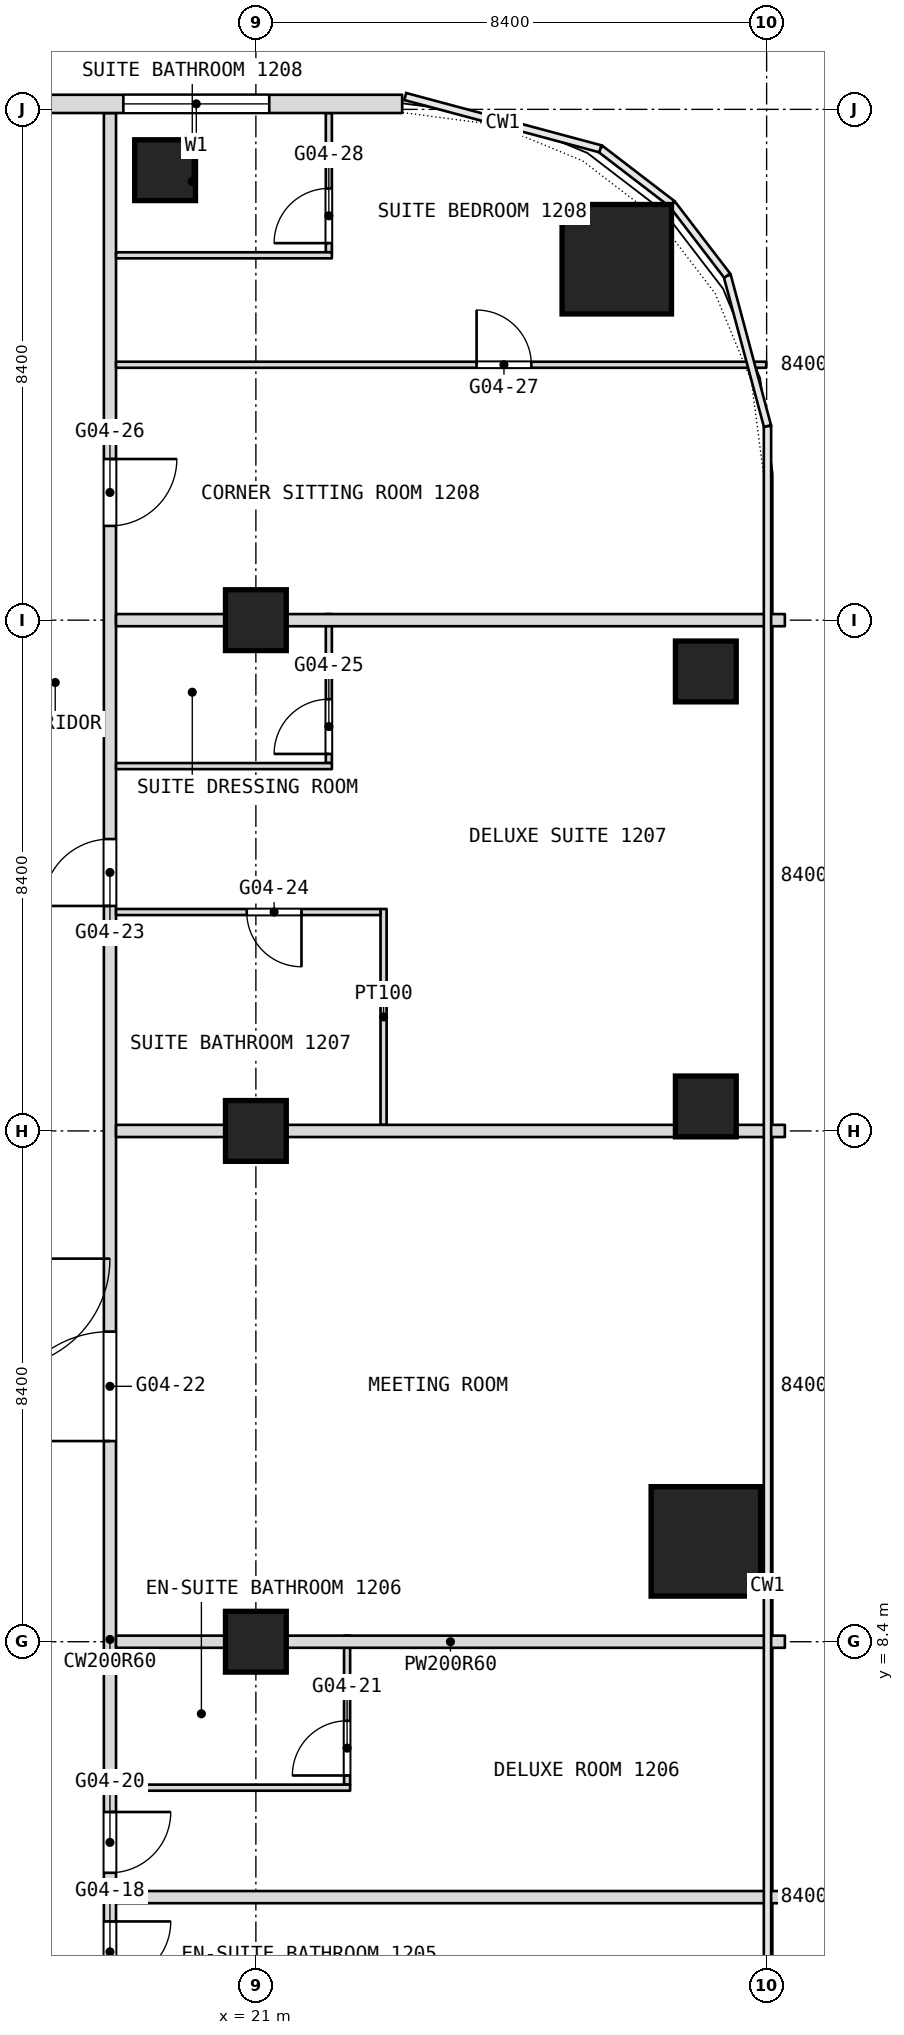
"""IFC4 building model, lengths in metres.
Left out: names, types, materials, properties, quantities, classifications, styles, units other than length and angle.
Written with IfcOpenShell. Run it as: python <this file> out.ifc"""

import sys

from ifc_helpers import new_model, si_unit, direction, frame, frame_2d, origin, origin_2d, place, context, subcontext, project, spatial, rectangle, extrude, element, fill, save


model = new_model("IFC4")
c1 = context("Model", 3, precision=1e-05, world=origin(), true_north=direction((0.0, 1.0)))
c2 = subcontext(c1, "Body", "Model", "MODEL_VIEW")
j1 = project(units=[si_unit("LENGTHUNIT", "METRE"), si_unit("PLANEANGLEUNIT", "RADIAN")], contexts=[c1])
p1 = place(None, origin())
s1 = spatial("IfcSite", under=j1, at=p1, CompositionType="ELEMENT")
p2 = place(p1, origin())
s2 = spatial("IfcBuilding", under=s1, at=p2, CompositionType="ELEMENT")
p3 = place(p2, frame((0.0, 0.0, 58.1)))
s3 = spatial("IfcBuildingStorey", under=s2, at=p3, CompositionType="ELEMENT", Elevation=58.1)
for number, where, z_axis, x_axis in (
    (1, (28.4, 10.05, 0.0), (0.0, 0.0, 1.0), (1.0, 0.0, 0.0)),
    (2, (26.936, 31.135, 0.0), (0.0, 0.0, 1.0), (1.0, 0.0, 0.0)),
):
    element("IfcColumn", number, at=place(p3, frame(where, z_axis=z_axis, x_axis=x_axis)), inside=s3, PredefinedType="COLUMN", context=c2, shape_type="SweptSolid", body=[
        extrude(rectangle(XDim=1.8, YDim=1.8, at=origin_2d()), origin(), (0.0, 0.0, 1.0), 3.6),
    ])
for number, where, z_axis, x_axis in (
    (3, (21.0, 8.4, 0.0), (0.0, 0.0, 1.0), (1.0, 0.0, 0.0)),
    (4, (21.0, 16.8, 0.0), (0.0, 0.0, 1.0), (1.0, 0.0, 0.0)),
    (5, (21.0, 25.2, 0.0), (0.0, 0.0, 1.0), (1.0, 0.0, 0.0)),
    (6, (19.507, 32.6, 0.0), (0.0, 0.0, 1.0), (1.0, 0.0, 0.0)),
    (7, (28.4, 24.356, 0.0), (0.0, 0.0, 1.0), (1.0, 0.0, 0.0)),
    (8, (28.4, 17.203, 0.0), (0.0, 0.0, 1.0), (1.0, 0.0, 0.0)),
):
    element("IfcColumn", number, at=place(p3, frame(where, z_axis=z_axis, x_axis=x_axis)), inside=s3, PredefinedType="COLUMN", context=c2, shape_type="SweptSolid", body=[
        extrude(rectangle(XDim=1.0, YDim=1.0, at=origin_2d()), origin(), (0.0, 0.0, 1.0), 3.6),
    ])
p4 = place(p3, frame((23.1, 16.9, 0.0), z_axis=(0.0, 0.0, 1.0), x_axis=(0.0, 1.0, 0.0)))
e9 = element("IfcWall", 9, at=p4, inside=s3, PredefinedType="PARTITIONING", context=c2, shape_type="SweptSolid", body=[
    extrude(rectangle(XDim=3.55, YDim=0.1, at=frame_2d((1.775, 0.0))), origin(), (0.0, 0.0, 1.0), 3.34),
])
p5 = place(p3, frame((22.5, 6.05, 0.0), z_axis=(0.0, 0.0, 1.0), x_axis=(0.0, 1.0, 0.0)))
e10 = element("IfcWall", 10, at=p5, inside=s3, PredefinedType="PARTITIONING", context=c2, shape_type="SweptSolid", body=[
    extrude(rectangle(XDim=2.45, YDim=0.1, at=frame_2d((1.225, 0.0))), origin(), (0.0, 0.0, 1.0), 3.34),
])
p6 = place(p5, frame((0.15, 0.0, 0.0)))
e11 = element("IfcOpeningElement", 11, at=p6, cuts=e10, PredefinedType="OPENING", context=c2, shape_type="SweptSolid", body=[
    extrude(rectangle(XDim=0.9, YDim=2.1, at=frame_2d((0.45, 1.05))), frame((0.0, 0.05, 0.0), z_axis=(0.0, -1.0, 0.0), x_axis=(1.0, 0.0, 0.0)), (0.0, 0.0, 1.0), 0.1),
])
p7 = place(p3, frame((22.2, 22.85, 0.0), z_axis=(0.0, 0.0, 1.0), x_axis=(0.0, 1.0, 0.0)))
e12 = element("IfcWall", 12, at=p7, inside=s3, PredefinedType="PARTITIONING", context=c2, shape_type="SweptSolid", body=[
    extrude(rectangle(XDim=2.45, YDim=0.1, at=frame_2d((1.225, 0.0))), origin(), (0.0, 0.0, 1.0), 3.34),
])
p8 = place(p7, frame((0.15, 0.0, 0.0)))
e13 = element("IfcOpeningElement", 13, at=p8, cuts=e12, PredefinedType="OPENING", context=c2, shape_type="SweptSolid", body=[
    extrude(rectangle(XDim=0.9, YDim=2.1, at=frame_2d((0.45, 1.05))), frame((0.0, 0.05, 0.0), z_axis=(0.0, -1.0, 0.0), x_axis=(1.0, 0.0, 0.0)), (0.0, 0.0, 1.0), 0.1),
])
p9 = place(p3, frame((22.2, 31.25, 0.0), z_axis=(0.0, 0.0, 1.0), x_axis=(0.0, 1.0, 0.0)))
e14 = element("IfcWall", 14, at=p9, inside=s3, PredefinedType="PARTITIONING", context=c2, shape_type="SweptSolid", body=[
    extrude(rectangle(XDim=2.29, YDim=0.1, at=frame_2d((1.145, 0.0))), origin(), (0.0, 0.0, 1.0), 3.34),
])
p10 = place(p9, frame((0.15, 0.0, 0.0)))
e15 = element("IfcOpeningElement", 15, at=p10, cuts=e14, PredefinedType="OPENING", context=c2, shape_type="SweptSolid", body=[
    extrude(rectangle(XDim=0.9, YDim=2.1, at=frame_2d((0.45, 1.05))), frame((0.0, 0.05, 0.0), z_axis=(0.0, -1.0, 0.0), x_axis=(1.0, 0.0, 0.0)), (0.0, 0.0, 1.0), 0.1),
])
p11 = place(p3, frame((18.6, -16.665, 0.0), z_axis=(0.0, 0.0, 1.0), x_axis=(0.0, 1.0, 0.0)))
e16 = element("IfcWall", 16, at=p11, inside=s3, PredefinedType="PARTITIONING", context=c2, shape_type="SweptSolid", body=[
    extrude(rectangle(XDim=50.205, YDim=0.2, at=frame_2d((25.103, 0.0))), origin(), (0.0, 0.0, 1.0), 3.34),
])
p12 = place(p11, frame((2.991, 0.0, 0.0)))
e17 = element("IfcOpeningElement", 17, at=p12, cuts=e16, PredefinedType="OPENING", context=c2, shape_type="SweptSolid", body=[
    extrude(rectangle(XDim=1.0, YDim=2.1, at=frame_2d((0.5, 1.05))), frame((0.0, 0.1, 0.0), z_axis=(0.0, -1.0, 0.0), x_axis=(1.0, 0.0, 0.0)), (0.0, 0.0, 1.0), 0.2),
])
p13 = place(p11, frame((4.574, 0.0, 0.0)))
e18 = element("IfcOpeningElement", 18, at=p13, cuts=e16, PredefinedType="OPENING", context=c2, shape_type="SweptSolid", body=[
    extrude(rectangle(XDim=1.0, YDim=2.1, at=frame_2d((0.5, 1.05))), frame((0.0, 0.1, 0.0), z_axis=(0.0, -1.0, 0.0), x_axis=(1.0, 0.0, 0.0)), (0.0, 0.0, 1.0), 0.2),
])
p14 = place(p11, frame((8.665, 0.0, 0.0)))
e19 = element("IfcOpeningElement", 19, at=p14, cuts=e16, PredefinedType="OPENING", context=c2, shape_type="SweptSolid", body=[
    extrude(rectangle(XDim=1.0, YDim=2.1, at=frame_2d((0.5, 1.05))), frame((0.0, 0.1, 0.0), z_axis=(0.0, -1.0, 0.0), x_axis=(1.0, 0.0, 0.0)), (0.0, 0.0, 1.0), 0.2),
])
p15 = place(p11, frame((15.265, 0.0, 0.0)))
e20 = element("IfcOpeningElement", 20, at=p15, cuts=e16, PredefinedType="OPENING", context=c2, shape_type="SweptSolid", body=[
    extrude(rectangle(XDim=1.0, YDim=2.1, at=frame_2d((0.5, 1.05))), frame((0.0, 0.1, 0.0), z_axis=(0.0, -1.0, 0.0), x_axis=(1.0, 0.0, 0.0)), (0.0, 0.0, 1.0), 0.2),
])
p16 = place(p11, frame((19.465, 0.0, 0.0)))
e21 = element("IfcOpeningElement", 21, at=p16, cuts=e16, PredefinedType="OPENING", context=c2, shape_type="SweptSolid", body=[
    extrude(rectangle(XDim=1.0, YDim=2.1, at=frame_2d((0.5, 1.05))), frame((0.0, 0.1, 0.0), z_axis=(0.0, -1.0, 0.0), x_axis=(1.0, 0.0, 0.0)), (0.0, 0.0, 1.0), 0.2),
])
p17 = place(p11, frame((21.265, 0.0, 0.0)))
e22 = element("IfcOpeningElement", 22, at=p17, cuts=e16, PredefinedType="OPENING", context=c2, shape_type="SweptSolid", body=[
    extrude(rectangle(XDim=1.0, YDim=2.1, at=frame_2d((0.5, 1.05))), frame((0.0, 0.1, 0.0), z_axis=(0.0, -1.0, 0.0), x_axis=(1.0, 0.0, 0.0)), (0.0, 0.0, 1.0), 0.2),
])
p18 = place(p11, frame((28.365, 0.0, 0.0)))
e23 = element("IfcOpeningElement", 23, at=p18, cuts=e16, PredefinedType="OPENING", context=c2, shape_type="SweptSolid", body=[
    extrude(rectangle(XDim=1.8, YDim=2.1, at=frame_2d((0.9, 1.05))), frame((0.0, 0.1, 0.0), z_axis=(0.0, -1.0, 0.0), x_axis=(1.0, 0.0, 0.0)), (0.0, 0.0, 1.0), 0.2),
])
p19 = place(p11, frame((37.165, 0.0, 0.0)))
e24 = element("IfcOpeningElement", 24, at=p19, cuts=e16, PredefinedType="OPENING", context=c2, shape_type="SweptSolid", body=[
    extrude(rectangle(XDim=1.1, YDim=2.1, at=frame_2d((0.55, 1.05))), frame((0.0, 0.1, 0.0), z_axis=(0.0, -1.0, 0.0), x_axis=(1.0, 0.0, 0.0)), (0.0, 0.0, 1.0), 0.2),
])
p20 = place(p11, frame((43.415, 0.0, 0.0)))
e25 = element("IfcOpeningElement", 25, at=p20, cuts=e16, PredefinedType="OPENING", context=c2, shape_type="SweptSolid", body=[
    extrude(rectangle(XDim=1.1, YDim=2.1, at=frame_2d((0.55, 1.05))), frame((0.0, 0.1, 0.0), z_axis=(0.0, -1.0, 0.0), x_axis=(1.0, 0.0, 0.0)), (0.0, 0.0, 1.0), 0.2),
])
p21 = place(p3, frame((18.7, 4.2, 0.0), z_axis=(0.0, 0.0, 1.0), x_axis=(1.0, 0.0, 0.0)))
e26 = element("IfcWall", 26, at=p21, inside=s3, PredefinedType="PARTITIONING", context=c2, shape_type="SweptSolid", body=[
    extrude(rectangle(XDim=11.0, YDim=0.2, at=frame_2d((5.5, 0.0))), origin(), (0.0, 0.0, 1.0), 3.34),
])
p22 = place(p3, frame((18.7, 6.0, 0.0), z_axis=(0.0, 0.0, 1.0), x_axis=(1.0, 0.0, 0.0)))
e27 = element("IfcWall", 27, at=p22, inside=s3, PredefinedType="PARTITIONING", context=c2, shape_type="SweptSolid", body=[
    extrude(rectangle(XDim=3.85, YDim=0.1, at=frame_2d((1.925, 0.0))), origin(), (0.0, 0.0, 1.0), 3.34),
])
for number, where, z_axis, x_axis in (
    (28, (18.7, 8.4, 0.0), (0.0, 0.0, 1.0), (1.0, 0.0, 0.0)),
    (29, (18.7, 16.8, 0.0), (0.0, 0.0, 1.0), (1.0, 0.0, 0.0)),
):
    element("IfcWall", number, at=place(p3, frame(where, z_axis=z_axis, x_axis=x_axis)), inside=s3, PredefinedType="PARTITIONING", context=c2, shape_type="SweptSolid", body=[
        extrude(rectangle(XDim=11.0, YDim=0.2, at=frame_2d((5.5, 0.0))), origin(), (0.0, 0.0, 1.0), 2.84),
    ])
p23 = place(p3, frame((18.7, 20.4, 0.0), z_axis=(0.0, 0.0, 1.0), x_axis=(1.0, 0.0, 0.0)))
e30 = element("IfcWall", 30, at=p23, inside=s3, PredefinedType="PARTITIONING", context=c2, shape_type="SweptSolid", body=[
    extrude(rectangle(XDim=4.35, YDim=0.1, at=frame_2d((2.175, 0.0))), origin(), (0.0, 0.0, 1.0), 3.34),
])
p24 = place(p23, frame((2.15, 0.0, 0.0)))
e31 = element("IfcOpeningElement", 31, at=p24, cuts=e30, PredefinedType="OPENING", context=c2, shape_type="SweptSolid", body=[
    extrude(rectangle(XDim=0.9, YDim=2.1, at=frame_2d((0.45, 1.05))), frame((0.0, 0.05, 0.0), z_axis=(0.0, -1.0, 0.0), x_axis=(1.0, 0.0, 0.0)), (0.0, 0.0, 1.0), 0.1),
])
p25 = place(p3, frame((18.7, 22.8, 0.0), z_axis=(0.0, 0.0, 1.0), x_axis=(1.0, 0.0, 0.0)))
e32 = element("IfcWall", 32, at=p25, inside=s3, PredefinedType="PARTITIONING", context=c2, shape_type="SweptSolid", body=[
    extrude(rectangle(XDim=3.55, YDim=0.1, at=frame_2d((1.775, 0.0))), origin(), (0.0, 0.0, 1.0), 3.34),
])
p26 = place(p3, frame((18.7, 25.2, 0.0), z_axis=(0.0, 0.0, 1.0), x_axis=(1.0, 0.0, 0.0)))
e33 = element("IfcWall", 33, at=p26, inside=s3, PredefinedType="PARTITIONING", context=c2, shape_type="SweptSolid", body=[
    extrude(rectangle(XDim=11.0, YDim=0.2, at=frame_2d((5.5, 0.0))), origin(), (0.0, 0.0, 1.0), 2.84),
])
p27 = place(p3, frame((18.7, 29.4, 0.0), z_axis=(0.0, 0.0, 1.0), x_axis=(1.0, 0.0, 0.0)))
e34 = element("IfcWall", 34, at=p27, inside=s3, PredefinedType="PARTITIONING", context=c2, shape_type="SweptSolid", body=[
    extrude(rectangle(XDim=10.693, YDim=0.1, at=frame_2d((5.347, 0.0))), origin(), (0.0, 0.0, 1.0), 3.34),
])
p28 = place(p27, frame((5.93, 0.0, 0.0)))
e35 = element("IfcOpeningElement", 35, at=p28, cuts=e34, PredefinedType="OPENING", context=c2, shape_type="SweptSolid", body=[
    extrude(rectangle(XDim=0.9, YDim=2.1, at=frame_2d((0.45, 1.05))), frame((0.0, 0.05, 0.0), z_axis=(0.0, -1.0, 0.0), x_axis=(1.0, 0.0, 0.0)), (0.0, 0.0, 1.0), 0.1),
])
p29 = place(p3, frame((18.7, 31.2, 0.0), z_axis=(0.0, 0.0, 1.0), x_axis=(1.0, 0.0, 0.0)))
e36 = element("IfcWall", 36, at=p29, inside=s3, PredefinedType="PARTITIONING", context=c2, shape_type="SweptSolid", body=[
    extrude(rectangle(XDim=3.55, YDim=0.1, at=frame_2d((1.775, 0.0))), origin(), (0.0, 0.0, 1.0), 3.34),
])
p30 = place(p3, frame((23.406, 33.69, 0.0), z_axis=(0.0, 0.0, 1.0), x_axis=(-1.0, 0.0, 0.0)))
e37 = element("IfcWall", 37, at=p30, inside=s3, PredefinedType="NOTDEFINED", context=c2, shape_type="SweptSolid", body=[
    extrude(rectangle(XDim=46.812, YDim=0.3, at=frame_2d((23.406, 0.0))), origin(), (0.0, 0.0, 1.0), 3.6),
])
p31 = place(p30, frame((2.186, 0.0, 0.9)))
e38 = element("IfcOpeningElement", 38, at=p31, cuts=e37, PredefinedType="OPENING", context=c2, shape_type="SweptSolid", body=[
    extrude(rectangle(XDim=2.4, YDim=2.1, at=frame_2d((1.2, 1.05))), frame((0.0, 0.15, 0.0), z_axis=(0.0, -1.0, 0.0), x_axis=(1.0, 0.0, 0.0)), (0.0, 0.0, 1.0), 0.3),
])
p32 = place(p30, frame((7.506, 0.0, 0.9)))
e39 = element("IfcOpeningElement", 39, at=p32, cuts=e37, PredefinedType="OPENING", context=c2, shape_type="SweptSolid", body=[
    extrude(rectangle(XDim=2.4, YDim=2.1, at=frame_2d((1.2, 1.05))), frame((0.0, 0.15, 0.0), z_axis=(0.0, -1.0, 0.0), x_axis=(1.0, 0.0, 0.0)), (0.0, 0.0, 1.0), 0.3),
])
p33 = place(p30, frame((11.706, 0.0, 0.9)))
e40 = element("IfcOpeningElement", 40, at=p33, cuts=e37, PredefinedType="OPENING", context=c2, shape_type="SweptSolid", body=[
    extrude(rectangle(XDim=2.4, YDim=2.1, at=frame_2d((1.2, 1.05))), frame((0.0, 0.15, 0.0), z_axis=(0.0, -1.0, 0.0), x_axis=(1.0, 0.0, 0.0)), (0.0, 0.0, 1.0), 0.3),
])
p34 = place(p30, frame((15.906, 0.0, 0.9)))
e41 = element("IfcOpeningElement", 41, at=p34, cuts=e37, PredefinedType="OPENING", context=c2, shape_type="SweptSolid", body=[
    extrude(rectangle(XDim=2.4, YDim=2.1, at=frame_2d((1.2, 1.05))), frame((0.0, 0.15, 0.0), z_axis=(0.0, -1.0, 0.0), x_axis=(1.0, 0.0, 0.0)), (0.0, 0.0, 1.0), 0.3),
])
p35 = place(p30, frame((20.106, 0.0, 0.9)))
e42 = element("IfcOpeningElement", 42, at=p35, cuts=e37, PredefinedType="OPENING", context=c2, shape_type="SweptSolid", body=[
    extrude(rectangle(XDim=2.4, YDim=2.1, at=frame_2d((1.2, 1.05))), frame((0.0, 0.15, 0.0), z_axis=(0.0, -1.0, 0.0), x_axis=(1.0, 0.0, 0.0)), (0.0, 0.0, 1.0), 0.3),
])
p36 = place(p30, frame((24.306, 0.0, 0.9)))
e43 = element("IfcOpeningElement", 43, at=p36, cuts=e37, PredefinedType="OPENING", context=c2, shape_type="SweptSolid", body=[
    extrude(rectangle(XDim=2.4, YDim=2.1, at=frame_2d((1.2, 1.05))), frame((0.0, 0.15, 0.0), z_axis=(0.0, -1.0, 0.0), x_axis=(1.0, 0.0, 0.0)), (0.0, 0.0, 1.0), 0.3),
])
p37 = place(p30, frame((28.506, 0.0, 0.9)))
e44 = element("IfcOpeningElement", 44, at=p37, cuts=e37, PredefinedType="OPENING", context=c2, shape_type="SweptSolid", body=[
    extrude(rectangle(XDim=2.4, YDim=2.1, at=frame_2d((1.2, 1.05))), frame((0.0, 0.15, 0.0), z_axis=(0.0, -1.0, 0.0), x_axis=(1.0, 0.0, 0.0)), (0.0, 0.0, 1.0), 0.3),
])
p38 = place(p30, frame((32.706, 0.0, 0.9)))
e45 = element("IfcOpeningElement", 45, at=p38, cuts=e37, PredefinedType="OPENING", context=c2, shape_type="SweptSolid", body=[
    extrude(rectangle(XDim=2.4, YDim=2.1, at=frame_2d((1.2, 1.05))), frame((0.0, 0.15, 0.0), z_axis=(0.0, -1.0, 0.0), x_axis=(1.0, 0.0, 0.0)), (0.0, 0.0, 1.0), 0.3),
])
p39 = place(p30, frame((36.906, 0.0, 0.9)))
e46 = element("IfcOpeningElement", 46, at=p39, cuts=e37, PredefinedType="OPENING", context=c2, shape_type="SweptSolid", body=[
    extrude(rectangle(XDim=2.4, YDim=2.1, at=frame_2d((1.2, 1.05))), frame((0.0, 0.15, 0.0), z_axis=(0.0, -1.0, 0.0), x_axis=(1.0, 0.0, 0.0)), (0.0, 0.0, 1.0), 0.3),
])
p40 = place(p30, frame((42.226, 0.0, 0.9)))
e47 = element("IfcOpeningElement", 47, at=p40, cuts=e37, PredefinedType="OPENING", context=c2, shape_type="SweptSolid", body=[
    extrude(rectangle(XDim=2.4, YDim=2.1, at=frame_2d((1.2, 1.05))), frame((0.0, 0.15, 0.0), z_axis=(0.0, -1.0, 0.0), x_axis=(1.0, 0.0, 0.0)), (0.0, 0.0, 1.0), 0.3),
])
p41 = place(p6, origin())
e48 = element("IfcDoor", 48, at=p41, inside=s3, OperationType="SINGLE_SWING_LEFT", PredefinedType="DOOR", context=c2, shape_type="SweptSolid", body=[
    extrude(rectangle(XDim=0.9, YDim=2.1, at=frame_2d((0.45, 1.05))), frame((0.0, 0.025, 0.0), z_axis=(0.0, -1.0, 0.0), x_axis=(1.0, 0.0, 0.0)), (0.0, 0.0, 1.0), 0.05),
])
fill(e11, e48)
p42 = place(p8, origin())
e49 = element("IfcDoor", 49, at=p42, inside=s3, OperationType="SINGLE_SWING_LEFT", PredefinedType="DOOR", context=c2, shape_type="SweptSolid", body=[
    extrude(rectangle(XDim=0.9, YDim=2.1, at=frame_2d((0.45, 1.05))), frame((0.0, 0.025, 0.0), z_axis=(0.0, -1.0, 0.0), x_axis=(1.0, 0.0, 0.0)), (0.0, 0.0, 1.0), 0.05),
])
fill(e13, e49)
p43 = place(p10, origin())
e50 = element("IfcDoor", 50, at=p43, inside=s3, OperationType="SINGLE_SWING_LEFT", PredefinedType="DOOR", context=c2, shape_type="SweptSolid", body=[
    extrude(rectangle(XDim=0.9, YDim=2.1, at=frame_2d((0.45, 1.05))), frame((0.0, 0.025, 0.0), z_axis=(0.0, -1.0, 0.0), x_axis=(1.0, 0.0, 0.0)), (0.0, 0.0, 1.0), 0.05),
])
fill(e15, e50)
p44 = place(p16, origin())
e51 = element("IfcDoor", 51, at=p44, inside=s3, OperationType="SINGLE_SWING_RIGHT", PredefinedType="DOOR", context=c2, shape_type="SweptSolid", body=[
    extrude(rectangle(XDim=1.0, YDim=2.1, at=frame_2d((0.5, 1.05))), frame((0.0, 0.025, 0.0), z_axis=(0.0, -1.0, 0.0), x_axis=(1.0, 0.0, 0.0)), (0.0, 0.0, 1.0), 0.05),
])
fill(e21, e51)
p45 = place(p17, origin())
e52 = element("IfcDoor", 52, at=p45, inside=s3, OperationType="SINGLE_SWING_RIGHT", PredefinedType="DOOR", context=c2, shape_type="SweptSolid", body=[
    extrude(rectangle(XDim=1.0, YDim=2.1, at=frame_2d((0.5, 1.05))), frame((0.0, 0.025, 0.0), z_axis=(0.0, -1.0, 0.0), x_axis=(1.0, 0.0, 0.0)), (0.0, 0.0, 1.0), 0.05),
])
fill(e22, e52)
p46 = place(p18, origin())
e53 = element("IfcDoor", 53, at=p46, inside=s3, OperationType="DOUBLE_DOOR_SINGLE_SWING", PredefinedType="DOOR", context=c2, shape_type="SweptSolid", body=[
    extrude(rectangle(XDim=1.8, YDim=2.1, at=frame_2d((0.9, 1.05))), frame((0.0, 0.025, 0.0), z_axis=(0.0, -1.0, 0.0), x_axis=(1.0, 0.0, 0.0)), (0.0, 0.0, 1.0), 0.05),
])
fill(e23, e53)
p47 = place(p19, origin())
e54 = element("IfcDoor", 54, at=p47, inside=s3, OperationType="SINGLE_SWING_RIGHT", PredefinedType="DOOR", context=c2, shape_type="SweptSolid", body=[
    extrude(rectangle(XDim=1.1, YDim=2.1, at=frame_2d((0.55, 1.05))), frame((0.0, 0.025, 0.0), z_axis=(0.0, -1.0, 0.0), x_axis=(1.0, 0.0, 0.0)), (0.0, 0.0, 1.0), 0.05),
])
fill(e24, e54)
p48 = place(p20, origin())
e55 = element("IfcDoor", 55, at=p48, inside=s3, OperationType="SINGLE_SWING_RIGHT", PredefinedType="DOOR", context=c2, shape_type="SweptSolid", body=[
    extrude(rectangle(XDim=1.1, YDim=2.1, at=frame_2d((0.55, 1.05))), frame((0.0, 0.025, 0.0), z_axis=(0.0, -1.0, 0.0), x_axis=(1.0, 0.0, 0.0)), (0.0, 0.0, 1.0), 0.05),
])
fill(e25, e55)
p49 = place(p24, origin())
e56 = element("IfcDoor", 56, at=p49, inside=s3, OperationType="SINGLE_SWING_LEFT", PredefinedType="DOOR", context=c2, shape_type="SweptSolid", body=[
    extrude(rectangle(XDim=0.9, YDim=2.1, at=frame_2d((0.45, 1.05))), frame((0.0, 0.025, 0.0), z_axis=(0.0, -1.0, 0.0), x_axis=(1.0, 0.0, 0.0)), (0.0, 0.0, 1.0), 0.05),
])
fill(e31, e56)
p50 = place(p28, origin())
e57 = element("IfcDoor", 57, at=p50, inside=s3, OperationType="SINGLE_SWING_RIGHT", PredefinedType="DOOR", context=c2, shape_type="SweptSolid", body=[
    extrude(rectangle(XDim=0.9, YDim=2.1, at=frame_2d((0.45, 1.05))), frame((0.0, 0.025, 0.0), z_axis=(0.0, -1.0, 0.0), x_axis=(1.0, 0.0, 0.0)), (0.0, 0.0, 1.0), 0.05),
])
fill(e35, e57)
p51 = place(p31, origin())
e58 = element("IfcWindow", 58, at=p51, inside=s3, PartitioningType="SINGLE_PANEL", PredefinedType="WINDOW", context=c2, shape_type="SweptSolid", body=[
    extrude(rectangle(XDim=2.4, YDim=2.1, at=frame_2d((1.2, 1.05))), frame((0.0, 0.03, 0.0), z_axis=(0.0, -1.0, 0.0), x_axis=(1.0, 0.0, 0.0)), (0.0, 0.0, 1.0), 0.06),
])
fill(e38, e58)
save(model, sys.argv[1])
